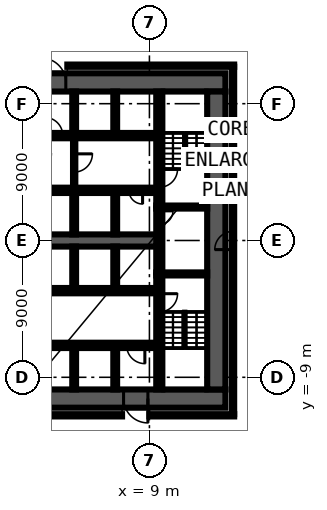
"""IFC4 building model, lengths in metres.
Left out: names, types, materials, properties, quantities, classifications, styles, units other than length and angle.
Written with IfcOpenShell. Run it as: python <this file> out.ifc"""

import sys

from ifc_helpers import new_model, si_unit, direction, frame, frame_2d, origin, place, context, subcontext, project, spatial, rectangle, extrude, element, fill, save


model = new_model("IFC4")
c1 = context("Model", 3, precision=1e-05, world=origin(), true_north=direction((0.0, 1.0)))
c2 = subcontext(c1, "Body", "Model", "MODEL_VIEW")
j1 = project(units=[si_unit("LENGTHUNIT", "METRE"), si_unit("PLANEANGLEUNIT", "RADIAN")], contexts=[c1])
p1 = place(None, origin())
s1 = spatial("IfcSite", under=j1, at=p1, CompositionType="ELEMENT")
p2 = place(p1, origin())
s2 = spatial("IfcBuilding", under=s1, at=p2, CompositionType="ELEMENT")
p3 = place(p2, frame((0.0, 0.0, -17.0)))
s3 = spatial("IfcBuildingStorey", under=s2, at=p3, CompositionType="ELEMENT", Elevation=-17.0)
p4 = place(p3, frame((-14.575, -11.5, 0.0), z_axis=(0.0, 0.0, 1.0), x_axis=(1.0, 0.0, 0.0)))
e1 = element("IfcWall", 1, at=p4, inside=s3, PredefinedType="PARTITIONING", context=c2, shape_type="SweptSolid", body=[
    extrude(rectangle(XDim=21.775, YDim=0.15, at=frame_2d((10.887, 0.0))), origin(), (0.0, 0.0, 1.0), 5.1),
])
p5 = place(p3, frame((9.0, -11.5, 0.0), z_axis=(0.0, 0.0, 1.0), x_axis=(1.0, 0.0, 0.0)))
e2 = element("IfcWall", 2, at=p5, inside=s3, PredefinedType="PARTITIONING", context=c2, shape_type="SweptSolid", body=[
    extrude(rectangle(XDim=5.575, YDim=0.15, at=frame_2d((2.788, 0.0))), origin(), (0.0, 0.0, 1.0), 5.1),
])
p6 = place(p3, frame((3.6, 11.5, 0.0), z_axis=(0.0, 0.0, 1.0), x_axis=(1.0, 0.0, 0.0)))
e3 = element("IfcWall", 3, at=p6, inside=s3, PredefinedType="PARTITIONING", context=c2, shape_type="SweptSolid", body=[
    extrude(rectangle(XDim=10.975, YDim=0.15, at=frame_2d((5.487, 0.0))), origin(), (0.0, 0.0, 1.0), 5.1),
])
p7 = place(p3, frame((14.5, -11.425, 0.0), z_axis=(0.0, 0.0, 1.0), x_axis=(0.0, 1.0, 0.0)))
e4 = element("IfcWall", 4, at=p7, inside=s3, PredefinedType="PARTITIONING", context=c2, shape_type="SweptSolid", body=[
    extrude(rectangle(XDim=22.85, YDim=0.15, at=frame_2d((11.425, 0.0))), origin(), (0.0, 0.0, 1.0), 5.1),
])
p8 = place(p7, frame((10.825, 0.0, 0.0)))
e5 = element("IfcOpeningElement", 5, at=p8, cuts=e4, PredefinedType="OPENING", context=c2, shape_type="SweptSolid", body=[
    extrude(rectangle(XDim=1.2, YDim=2.1, at=frame_2d((0.6, 1.05))), frame((0.0, 0.085, 0.0), z_axis=(0.0, -1.0, 0.0), x_axis=(1.0, 0.0, 0.0)), (0.0, 0.0, 1.0), 0.17),
])
p9 = place(p3, frame((-14.0, 10.4, 0.0), z_axis=(0.0, 0.0, 1.0), x_axis=(1.0, 0.0, 0.0)))
e6 = element("IfcWall", 6, at=p9, inside=s3, PredefinedType="SHEAR", context=c2, shape_type="SweptSolid", body=[
    extrude(rectangle(XDim=28.0, YDim=1.2, at=frame_2d((14.0, 0.0))), origin(), (0.0, 0.0, 1.0), 5.1),
])
p10 = place(p9, frame((15.9, 0.0, 0.0)))
e7 = element("IfcOpeningElement", 7, at=p10, cuts=e6, PredefinedType="OPENING", context=c2, shape_type="SweptSolid", body=[
    extrude(rectangle(XDim=1.6, YDim=2.1, at=frame_2d((0.8, 1.05))), frame((0.0, 0.61, 0.0), z_axis=(0.0, -1.0, 0.0), x_axis=(1.0, 0.0, 0.0)), (0.0, 0.0, 1.0), 1.22),
])
p11 = place(p3, frame((14.0, -10.4, 0.0), z_axis=(0.0, 0.0, 1.0), x_axis=(-1.0, 0.0, 0.0)))
e8 = element("IfcWall", 8, at=p11, inside=s3, PredefinedType="SHEAR", context=c2, shape_type="SweptSolid", body=[
    extrude(rectangle(XDim=28.0, YDim=1.2, at=frame_2d((14.0, 0.0))), origin(), (0.0, 0.0, 1.0), 5.1),
])
p12 = place(p11, frame((5.1, 0.0, 0.0)))
e9 = element("IfcOpeningElement", 9, at=p12, cuts=e8, PredefinedType="OPENING", context=c2, shape_type="SweptSolid", body=[
    extrude(rectangle(XDim=1.6, YDim=2.1, at=frame_2d((0.8, 1.05))), frame((0.0, 0.61, 0.0), z_axis=(0.0, -1.0, 0.0), x_axis=(1.0, 0.0, 0.0)), (0.0, 0.0, 1.0), 1.22),
])
p13 = place(p3, frame((13.4, 9.8, 0.0), z_axis=(0.0, 0.0, 1.0), x_axis=(0.0, -1.0, 0.0)))
e10 = element("IfcWall", 10, at=p13, inside=s3, PredefinedType="SHEAR", context=c2, shape_type="SweptSolid", body=[
    extrude(rectangle(XDim=19.6, YDim=1.2, at=frame_2d((9.8, 0.0))), origin(), (0.0, 0.0, 1.0), 5.1),
])
p14 = place(p3, frame((9.65, -2.3, 0.0), z_axis=(0.0, 0.0, 1.0), x_axis=(0.0, -1.0, 0.0)))
e11 = element("IfcWall", 11, at=p14, inside=s3, PredefinedType="SHEAR", context=c2, shape_type="SweptSolid", body=[
    extrude(rectangle(XDim=7.5, YDim=0.4, at=frame_2d((3.75, 0.0))), origin(), (0.0, 0.0, 1.0), 5.1),
])
p15 = place(p14, frame((1.2, 0.0, 0.0)))
e12 = element("IfcOpeningElement", 12, at=p15, cuts=e11, PredefinedType="OPENING", context=c2, shape_type="SweptSolid", body=[
    extrude(rectangle(XDim=1.2, YDim=2.1, at=frame_2d((0.6, 1.05))), frame((0.0, 0.21, 0.0), z_axis=(0.0, -1.0, 0.0), x_axis=(1.0, 0.0, 0.0)), (0.0, 0.0, 1.0), 0.42),
])
p16 = place(p3, frame((9.65, 2.1, 0.0), z_axis=(0.0, 0.0, 1.0), x_axis=(0.0, -1.0, 0.0)))
e13 = element("IfcWall", 13, at=p16, inside=s3, PredefinedType="SHEAR", context=c2, shape_type="SweptSolid", body=[
    extrude(rectangle(XDim=4.2, YDim=0.4, at=frame_2d((2.1, 0.0))), origin(), (0.0, 0.0, 1.0), 5.1),
])
p17 = place(p16, frame((0.15, 0.0, 0.0)))
e14 = element("IfcOpeningElement", 14, at=p17, cuts=e13, PredefinedType="OPENING", context=c2, shape_type="SweptSolid", body=[
    extrude(rectangle(XDim=0.9, YDim=2.1, at=frame_2d((0.45, 1.05))), frame((0.0, 0.21, 0.0), z_axis=(0.0, -1.0, 0.0), x_axis=(1.0, 0.0, 0.0)), (0.0, 0.0, 1.0), 0.42),
])
p18 = place(p3, frame((9.65, 9.8, 0.0), z_axis=(0.0, 0.0, 1.0), x_axis=(0.0, -1.0, 0.0)))
e15 = element("IfcWall", 15, at=p18, inside=s3, PredefinedType="SHEAR", context=c2, shape_type="SweptSolid", body=[
    extrude(rectangle(XDim=7.5, YDim=0.4, at=frame_2d((3.75, 0.0))), origin(), (0.0, 0.0, 1.0), 5.1),
])
p19 = place(p18, frame((5.1, 0.0, 0.0)))
e16 = element("IfcOpeningElement", 16, at=p19, cuts=e15, PredefinedType="OPENING", context=c2, shape_type="SweptSolid", body=[
    extrude(rectangle(XDim=1.2, YDim=2.1, at=frame_2d((0.6, 1.05))), frame((0.0, 0.21, 0.0), z_axis=(0.0, -1.0, 0.0), x_axis=(1.0, 0.0, 0.0)), (0.0, 0.0, 1.0), 0.42),
])
for number, where, z_axis, x_axis in (
    (17, (9.45, 2.2, 0.0), (0.0, 0.0, 1.0), (1.0, 0.0, 0.0)),
    (18, (9.45, -2.2, 0.0), (0.0, 0.0, 1.0), (1.0, 0.0, 0.0)),
):
    element("IfcWall", number, at=place(p3, frame(where, z_axis=z_axis, x_axis=x_axis)), inside=s3, PredefinedType="SHEAR", context=c2, shape_type="SweptSolid", body=[
        extrude(rectangle(XDim=3.35, YDim=0.2, at=frame_2d((1.675, 0.0))), origin(), (0.0, 0.0, 1.0), 5.1),
    ])
p20 = place(p3, frame((-9.45, 6.9, 0.0), z_axis=(0.0, 0.0, 1.0), x_axis=(1.0, 0.0, 0.0)))
e19 = element("IfcWall", 19, at=p20, inside=s3, PredefinedType="SHEAR", context=c2, shape_type="SweptSolid", body=[
    extrude(rectangle(XDim=18.9, YDim=0.35, at=frame_2d((9.45, 0.0))), origin(), (0.0, 0.0, 1.0), 5.1),
])
p21 = place(p20, frame((0.8, 0.0, 0.0)))
e20 = element("IfcOpeningElement", 20, at=p21, cuts=e19, PredefinedType="OPENING", context=c2, shape_type="SweptSolid", body=[
    extrude(rectangle(XDim=1.1, YDim=2.1, at=frame_2d((0.55, 1.05))), frame((0.0, 0.185, 0.0), z_axis=(0.0, -1.0, 0.0), x_axis=(1.0, 0.0, 0.0)), (0.0, 0.0, 1.0), 0.37),
])
p22 = place(p20, frame((3.5, 0.0, 0.0)))
e21 = element("IfcOpeningElement", 21, at=p22, cuts=e19, PredefinedType="OPENING", context=c2, shape_type="SweptSolid", body=[
    extrude(rectangle(XDim=1.1, YDim=2.1, at=frame_2d((0.55, 1.05))), frame((0.0, 0.185, 0.0), z_axis=(0.0, -1.0, 0.0), x_axis=(1.0, 0.0, 0.0)), (0.0, 0.0, 1.0), 0.37),
])
p23 = place(p20, frame((6.2, 0.0, 0.0)))
e22 = element("IfcOpeningElement", 22, at=p23, cuts=e19, PredefinedType="OPENING", context=c2, shape_type="SweptSolid", body=[
    extrude(rectangle(XDim=1.1, YDim=2.1, at=frame_2d((0.55, 1.05))), frame((0.0, 0.185, 0.0), z_axis=(0.0, -1.0, 0.0), x_axis=(1.0, 0.0, 0.0)), (0.0, 0.0, 1.0), 0.37),
])
p24 = place(p20, frame((8.9, 0.0, 0.0)))
e23 = element("IfcOpeningElement", 23, at=p24, cuts=e19, PredefinedType="OPENING", context=c2, shape_type="SweptSolid", body=[
    extrude(rectangle(XDim=1.1, YDim=2.1, at=frame_2d((0.55, 1.05))), frame((0.0, 0.185, 0.0), z_axis=(0.0, -1.0, 0.0), x_axis=(1.0, 0.0, 0.0)), (0.0, 0.0, 1.0), 0.37),
])
p25 = place(p20, frame((11.55, 0.0, 0.0)))
e24 = element("IfcOpeningElement", 24, at=p25, cuts=e19, PredefinedType="OPENING", context=c2, shape_type="SweptSolid", body=[
    extrude(rectangle(XDim=1.2, YDim=2.1, at=frame_2d((0.6, 1.05))), frame((0.0, 0.185, 0.0), z_axis=(0.0, -1.0, 0.0), x_axis=(1.0, 0.0, 0.0)), (0.0, 0.0, 1.0), 0.37),
])
p26 = place(p20, frame((14.3, 0.0, 0.0)))
e25 = element("IfcOpeningElement", 25, at=p26, cuts=e19, PredefinedType="OPENING", context=c2, shape_type="SweptSolid", body=[
    extrude(rectangle(XDim=1.1, YDim=2.1, at=frame_2d((0.55, 1.05))), frame((0.0, 0.185, 0.0), z_axis=(0.0, -1.0, 0.0), x_axis=(1.0, 0.0, 0.0)), (0.0, 0.0, 1.0), 0.37),
])
p27 = place(p20, frame((17.0, 0.0, 0.0)))
e26 = element("IfcOpeningElement", 26, at=p27, cuts=e19, PredefinedType="OPENING", context=c2, shape_type="SweptSolid", body=[
    extrude(rectangle(XDim=1.1, YDim=2.1, at=frame_2d((0.55, 1.05))), frame((0.0, 0.185, 0.0), z_axis=(0.0, -1.0, 0.0), x_axis=(1.0, 0.0, 0.0)), (0.0, 0.0, 1.0), 0.37),
])
p28 = place(p3, frame((9.45, 3.3, 0.0), z_axis=(0.0, 0.0, 1.0), x_axis=(-1.0, 0.0, 0.0)))
e27 = element("IfcWall", 27, at=p28, inside=s3, PredefinedType="SHEAR", context=c2, shape_type="SweptSolid", body=[
    extrude(rectangle(XDim=18.9, YDim=0.35, at=frame_2d((9.45, 0.0))), origin(), (0.0, 0.0, 1.0), 5.1),
])
p29 = place(p28, frame((6.2, 0.0, 0.0)))
e28 = element("IfcOpeningElement", 28, at=p29, cuts=e27, PredefinedType="OPENING", context=c2, shape_type="SweptSolid", body=[
    extrude(rectangle(XDim=1.1, YDim=2.1, at=frame_2d((0.55, 1.05))), frame((0.0, 0.185, 0.0), z_axis=(0.0, -1.0, 0.0), x_axis=(1.0, 0.0, 0.0)), (0.0, 0.0, 1.0), 0.37),
])
p30 = place(p28, frame((3.5, 0.0, 0.0)))
e29 = element("IfcOpeningElement", 29, at=p30, cuts=e27, PredefinedType="OPENING", context=c2, shape_type="SweptSolid", body=[
    extrude(rectangle(XDim=1.1, YDim=2.1, at=frame_2d((0.55, 1.05))), frame((0.0, 0.185, 0.0), z_axis=(0.0, -1.0, 0.0), x_axis=(1.0, 0.0, 0.0)), (0.0, 0.0, 1.0), 0.37),
])
p31 = place(p28, frame((0.9, 0.0, 0.0)))
e30 = element("IfcOpeningElement", 30, at=p31, cuts=e27, PredefinedType="OPENING", context=c2, shape_type="SweptSolid", body=[
    extrude(rectangle(XDim=0.9, YDim=2.1, at=frame_2d((0.45, 1.05))), frame((0.0, 0.185, 0.0), z_axis=(0.0, -1.0, 0.0), x_axis=(1.0, 0.0, 0.0)), (0.0, 0.0, 1.0), 0.37),
])
p32 = place(p3, frame((-9.45, -3.3, 0.0), z_axis=(0.0, 0.0, 1.0), x_axis=(1.0, 0.0, 0.0)))
e31 = element("IfcWall", 31, at=p32, inside=s3, PredefinedType="SHEAR", context=c2, shape_type="SweptSolid", body=[
    extrude(rectangle(XDim=18.9, YDim=0.35, at=frame_2d((9.45, 0.0))), origin(), (0.0, 0.0, 1.0), 5.1),
])
p33 = place(p32, frame((17.0, 0.0, 0.0)))
e32 = element("IfcOpeningElement", 32, at=p33, cuts=e31, PredefinedType="OPENING", context=c2, shape_type="SweptSolid", body=[
    extrude(rectangle(XDim=1.1, YDim=2.1, at=frame_2d((0.55, 1.05))), frame((0.0, 0.185, 0.0), z_axis=(0.0, -1.0, 0.0), x_axis=(1.0, 0.0, 0.0)), (0.0, 0.0, 1.0), 0.37),
])
p34 = place(p32, frame((3.6, 0.0, 0.0)))
e33 = element("IfcOpeningElement", 33, at=p34, cuts=e31, PredefinedType="OPENING", context=c2, shape_type="SweptSolid", body=[
    extrude(rectangle(XDim=0.9, YDim=2.1, at=frame_2d((0.45, 1.05))), frame((0.0, 0.185, 0.0), z_axis=(0.0, -1.0, 0.0), x_axis=(1.0, 0.0, 0.0)), (0.0, 0.0, 1.0), 0.37),
])
p35 = place(p32, frame((9.0, 0.0, 0.0)))
e34 = element("IfcOpeningElement", 34, at=p35, cuts=e31, PredefinedType="OPENING", context=c2, shape_type="SweptSolid", body=[
    extrude(rectangle(XDim=0.9, YDim=2.1, at=frame_2d((0.45, 1.05))), frame((0.0, 0.185, 0.0), z_axis=(0.0, -1.0, 0.0), x_axis=(1.0, 0.0, 0.0)), (0.0, 0.0, 1.0), 0.37),
])
p36 = place(p3, frame((9.45, -6.9, 0.0), z_axis=(0.0, 0.0, 1.0), x_axis=(-1.0, 0.0, 0.0)))
e35 = element("IfcWall", 35, at=p36, inside=s3, PredefinedType="SHEAR", context=c2, shape_type="SweptSolid", body=[
    extrude(rectangle(XDim=18.9, YDim=0.35, at=frame_2d((9.45, 0.0))), origin(), (0.0, 0.0, 1.0), 5.1),
])
p37 = place(p36, frame((0.75, 0.0, 0.0)))
e36 = element("IfcOpeningElement", 36, at=p37, cuts=e35, PredefinedType="OPENING", context=c2, shape_type="SweptSolid", body=[
    extrude(rectangle(XDim=1.2, YDim=2.1, at=frame_2d((0.6, 1.05))), frame((0.0, 0.185, 0.0), z_axis=(0.0, -1.0, 0.0), x_axis=(1.0, 0.0, 0.0)), (0.0, 0.0, 1.0), 0.37),
])
p38 = place(p36, frame((17.1, 0.0, 0.0)))
e37 = element("IfcOpeningElement", 37, at=p38, cuts=e35, PredefinedType="OPENING", context=c2, shape_type="SweptSolid", body=[
    extrude(rectangle(XDim=0.9, YDim=2.1, at=frame_2d((0.45, 1.05))), frame((0.0, 0.185, 0.0), z_axis=(0.0, -1.0, 0.0), x_axis=(1.0, 0.0, 0.0)), (0.0, 0.0, 1.0), 0.37),
])
p39 = place(p36, frame((13.05, 0.0, 0.0)))
e38 = element("IfcOpeningElement", 38, at=p39, cuts=e35, PredefinedType="OPENING", context=c2, shape_type="SweptSolid", body=[
    extrude(rectangle(XDim=0.9, YDim=2.1, at=frame_2d((0.45, 1.05))), frame((0.0, 0.185, 0.0), z_axis=(0.0, -1.0, 0.0), x_axis=(1.0, 0.0, 0.0)), (0.0, 0.0, 1.0), 0.37),
])
p40 = place(p36, frame((9.0, 0.0, 0.0)))
e39 = element("IfcOpeningElement", 39, at=p40, cuts=e35, PredefinedType="OPENING", context=c2, shape_type="SweptSolid", body=[
    extrude(rectangle(XDim=0.9, YDim=2.1, at=frame_2d((0.45, 1.05))), frame((0.0, 0.185, 0.0), z_axis=(0.0, -1.0, 0.0), x_axis=(1.0, 0.0, 0.0)), (0.0, 0.0, 1.0), 0.37),
])
p41 = place(p3, frame((-9.45, 0.0, 0.0), z_axis=(0.0, 0.0, 1.0), x_axis=(1.0, 0.0, 0.0)))
e40 = element("IfcWall", 40, at=p41, inside=s3, PredefinedType="SHEAR", context=c2, shape_type="SweptSolid", body=[
    extrude(rectangle(XDim=18.9, YDim=0.8, at=frame_2d((9.45, 0.0))), origin(), (0.0, 0.0, 1.0), 5.1),
])
for number, where, z_axis, x_axis in (
    (41, (6.75, -9.8, 0.0), (0.0, 0.0, 1.0), (0.0, 1.0, 0.0)),
    (42, (6.75, -3.125, 0.0), (0.0, 0.0, 1.0), (0.0, 1.0, 0.0)),
):
    element("IfcWall", number, at=place(p3, frame(where, z_axis=z_axis, x_axis=x_axis)), inside=s3, PredefinedType="SHEAR", context=c2, shape_type="SweptSolid", body=[
        extrude(rectangle(XDim=2.725, YDim=0.25, at=frame_2d((1.363, 0.0))), origin(), (0.0, 0.0, 1.0), 5.1),
    ])
for number, where, z_axis, x_axis in (
    (43, (6.75, 0.4, 0.0), (0.0, 0.0, 1.0), (0.0, 1.0, 0.0)),
    (44, (6.75, 7.075, 0.0), (0.0, 0.0, 1.0), (0.0, 1.0, 0.0)),
):
    element("IfcWall", number, at=place(p3, frame(where, z_axis=z_axis, x_axis=x_axis)), inside=s3, PredefinedType="SOLIDWALL", context=c2, shape_type="SweptSolid", body=[
        extrude(rectangle(XDim=2.725, YDim=0.25, at=frame_2d((1.363, 0.0))), origin(), (0.0, 0.0, 1.0), 5.1),
    ])
p42 = place(p3, frame((4.05, 6.725, 0.0), z_axis=(0.0, 0.0, 1.0), x_axis=(0.0, -1.0, 0.0)))
e45 = element("IfcWall", 45, at=p42, inside=s3, PredefinedType="PARTITIONING", context=c2, shape_type="SweptSolid", body=[
    extrude(rectangle(XDim=3.25, YDim=0.15, at=frame_2d((1.625, 0.0))), origin(), (0.0, 0.0, 1.0), 5.1),
])
p43 = place(p42, frame((1.025, 0.0, 0.0)))
e46 = element("IfcOpeningElement", 46, at=p43, cuts=e45, PredefinedType="OPENING", context=c2, shape_type="SweptSolid", body=[
    extrude(rectangle(XDim=1.2, YDim=2.1, at=frame_2d((0.6, 1.05))), frame((0.0, 0.085, 0.0), z_axis=(0.0, -1.0, 0.0), x_axis=(1.0, 0.0, 0.0)), (0.0, 0.0, 1.0), 0.17),
])
for number, where, z_axis, x_axis in (
    (47, (4.05, -9.8, 0.0), (0.0, 0.0, 1.0), (0.0, 1.0, 0.0)),
    (48, (4.05, -3.125, 0.0), (0.0, 0.0, 1.0), (0.0, 1.0, 0.0)),
):
    element("IfcWall", number, at=place(p3, frame(where, z_axis=z_axis, x_axis=x_axis)), inside=s3, PredefinedType="SHEAR", context=c2, shape_type="SweptSolid", body=[
        extrude(rectangle(XDim=2.725, YDim=0.25, at=frame_2d((1.363, 0.0))), origin(), (0.0, 0.0, 1.0), 5.1),
    ])
for number, where, z_axis, x_axis in (
    (49, (4.05, 0.4, 0.0), (0.0, 0.0, 1.0), (0.0, 1.0, 0.0)),
    (50, (4.05, 7.075, 0.0), (0.0, 0.0, 1.0), (0.0, 1.0, 0.0)),
):
    element("IfcWall", number, at=place(p3, frame(where, z_axis=z_axis, x_axis=x_axis)), inside=s3, PredefinedType="SOLIDWALL", context=c2, shape_type="SweptSolid", body=[
        extrude(rectangle(XDim=2.725, YDim=0.25, at=frame_2d((1.363, 0.0))), origin(), (0.0, 0.0, 1.0), 5.1),
    ])
p44 = place(p8, origin())
e51 = element("IfcDoor", 51, at=p44, inside=s3, OperationType="SINGLE_SWING_RIGHT", PredefinedType="DOOR", context=c2, shape_type="SweptSolid", body=[
    extrude(rectangle(XDim=1.2, YDim=2.1, at=frame_2d((0.6, 1.05))), frame((0.0, 0.025, 0.0), z_axis=(0.0, -1.0, 0.0), x_axis=(1.0, 0.0, 0.0)), (0.0, 0.0, 1.0), 0.05),
])
fill(e5, e51)
p45 = place(p17, origin())
e52 = element("IfcDoor", 52, at=p45, inside=s3, OperationType="SINGLE_SWING_RIGHT", PredefinedType="DOOR", context=c2, shape_type="SweptSolid", body=[
    extrude(rectangle(XDim=0.9, YDim=2.1, at=frame_2d((0.45, 1.05))), frame((0.0, 0.025, 0.0), z_axis=(0.0, -1.0, 0.0), x_axis=(1.0, 0.0, 0.0)), (0.0, 0.0, 1.0), 0.05),
])
fill(e14, e52)
p46 = place(p10, origin())
e53 = element("IfcDoor", 53, at=p46, inside=s3, OperationType="DOUBLE_DOOR_SINGLE_SWING", PredefinedType="DOOR", context=c2, shape_type="SweptSolid", body=[
    extrude(rectangle(XDim=1.6, YDim=2.1, at=frame_2d((0.8, 1.05))), frame((0.0, 0.025, 0.0), z_axis=(0.0, -1.0, 0.0), x_axis=(1.0, 0.0, 0.0)), (0.0, 0.0, 1.0), 0.05),
])
fill(e7, e53)
p47 = place(p25, origin())
e54 = element("IfcDoor", 54, at=p47, inside=s3, OperationType="SINGLE_SWING_LEFT", PredefinedType="DOOR", context=c2, shape_type="SweptSolid", body=[
    extrude(rectangle(XDim=1.2, YDim=2.1, at=frame_2d((0.6, 1.05))), frame((0.0, 0.025, 0.0), z_axis=(0.0, -1.0, 0.0), x_axis=(1.0, 0.0, 0.0)), (0.0, 0.0, 1.0), 0.05),
])
fill(e24, e54)
p48 = place(p26, origin())
e55 = element("IfcDoor", 55, at=p48, inside=s3, OperationType="DOUBLE_DOOR_SLIDING", PredefinedType="DOOR", context=c2, shape_type="SweptSolid", body=[
    extrude(rectangle(XDim=1.1, YDim=2.1, at=frame_2d((0.55, 1.05))), frame((0.0, 0.025, 0.0), z_axis=(0.0, -1.0, 0.0), x_axis=(1.0, 0.0, 0.0)), (0.0, 0.0, 1.0), 0.05),
])
fill(e25, e55)
p49 = place(p27, origin())
e56 = element("IfcDoor", 56, at=p49, inside=s3, OperationType="DOUBLE_DOOR_SLIDING", PredefinedType="DOOR", context=c2, shape_type="SweptSolid", body=[
    extrude(rectangle(XDim=1.1, YDim=2.1, at=frame_2d((0.55, 1.05))), frame((0.0, 0.025, 0.0), z_axis=(0.0, -1.0, 0.0), x_axis=(1.0, 0.0, 0.0)), (0.0, 0.0, 1.0), 0.05),
])
fill(e26, e56)
p50 = place(p29, origin())
e57 = element("IfcDoor", 57, at=p50, inside=s3, OperationType="DOUBLE_DOOR_SLIDING", PredefinedType="DOOR", context=c2, shape_type="SweptSolid", body=[
    extrude(rectangle(XDim=1.1, YDim=2.1, at=frame_2d((0.55, 1.05))), frame((0.0, 0.025, 0.0), z_axis=(0.0, -1.0, 0.0), x_axis=(1.0, 0.0, 0.0)), (0.0, 0.0, 1.0), 0.05),
])
fill(e28, e57)
p51 = place(p30, origin())
e58 = element("IfcDoor", 58, at=p51, inside=s3, OperationType="DOUBLE_DOOR_SLIDING", PredefinedType="DOOR", context=c2, shape_type="SweptSolid", body=[
    extrude(rectangle(XDim=1.1, YDim=2.1, at=frame_2d((0.55, 1.05))), frame((0.0, 0.025, 0.0), z_axis=(0.0, -1.0, 0.0), x_axis=(1.0, 0.0, 0.0)), (0.0, 0.0, 1.0), 0.05),
])
fill(e29, e58)
p52 = place(p31, origin())
e59 = element("IfcDoor", 59, at=p52, inside=s3, OperationType="SINGLE_SWING_LEFT", PredefinedType="DOOR", context=c2, shape_type="SweptSolid", body=[
    extrude(rectangle(XDim=0.9, YDim=2.1, at=frame_2d((0.45, 1.05))), frame((0.0, 0.025, 0.0), z_axis=(0.0, -1.0, 0.0), x_axis=(1.0, 0.0, 0.0)), (0.0, 0.0, 1.0), 0.05),
])
fill(e30, e59)
p53 = place(p33, origin())
e60 = element("IfcDoor", 60, at=p53, inside=s3, OperationType="DOUBLE_DOOR_SLIDING", PredefinedType="DOOR", context=c2, shape_type="SweptSolid", body=[
    extrude(rectangle(XDim=1.1, YDim=2.1, at=frame_2d((0.55, 1.05))), frame((0.0, 0.025, 0.0), z_axis=(0.0, -1.0, 0.0), x_axis=(1.0, 0.0, 0.0)), (0.0, 0.0, 1.0), 0.05),
])
fill(e32, e60)
p54 = place(p12, origin())
e61 = element("IfcDoor", 61, at=p54, inside=s3, OperationType="DOUBLE_DOOR_SINGLE_SWING", PredefinedType="DOOR", context=c2, shape_type="SweptSolid", body=[
    extrude(rectangle(XDim=1.6, YDim=2.1, at=frame_2d((0.8, 1.05))), frame((0.0, 0.025, 0.0), z_axis=(0.0, -1.0, 0.0), x_axis=(1.0, 0.0, 0.0)), (0.0, 0.0, 1.0), 0.05),
])
fill(e9, e61)
p55 = place(p37, origin())
e62 = element("IfcDoor", 62, at=p55, inside=s3, OperationType="SINGLE_SWING_LEFT", PredefinedType="DOOR", context=c2, shape_type="SweptSolid", body=[
    extrude(rectangle(XDim=1.2, YDim=2.1, at=frame_2d((0.6, 1.05))), frame((0.0, 0.025, 0.0), z_axis=(0.0, -1.0, 0.0), x_axis=(1.0, 0.0, 0.0)), (0.0, 0.0, 1.0), 0.05),
])
fill(e36, e62)
p56 = place(p19, origin())
e63 = element("IfcDoor", 63, at=p56, inside=s3, OperationType="SINGLE_SWING_LEFT", PredefinedType="DOOR", context=c2, shape_type="SweptSolid", body=[
    extrude(rectangle(XDim=1.2, YDim=2.1, at=frame_2d((0.6, 1.05))), frame((0.0, 0.025, 0.0), z_axis=(0.0, -1.0, 0.0), x_axis=(1.0, 0.0, 0.0)), (0.0, 0.0, 1.0), 0.05),
])
fill(e16, e63)
p57 = place(p15, origin())
e64 = element("IfcDoor", 64, at=p57, inside=s3, OperationType="SINGLE_SWING_RIGHT", PredefinedType="DOOR", context=c2, shape_type="SweptSolid", body=[
    extrude(rectangle(XDim=1.2, YDim=2.1, at=frame_2d((0.6, 1.05))), frame((0.0, 0.025, 0.0), z_axis=(0.0, -1.0, 0.0), x_axis=(1.0, 0.0, 0.0)), (0.0, 0.0, 1.0), 0.05),
])
fill(e12, e64)
p58 = place(p43, origin())
e65 = element("IfcDoor", 65, at=p58, inside=s3, OperationType="SINGLE_SWING_RIGHT", PredefinedType="DOOR", context=c2, shape_type="SweptSolid", body=[
    extrude(rectangle(XDim=1.2, YDim=2.1, at=frame_2d((0.6, 1.05))), frame((0.0, 0.025, 0.0), z_axis=(0.0, -1.0, 0.0), x_axis=(1.0, 0.0, 0.0)), (0.0, 0.0, 1.0), 0.05),
])
fill(e46, e65)
save(model, sys.argv[1])
